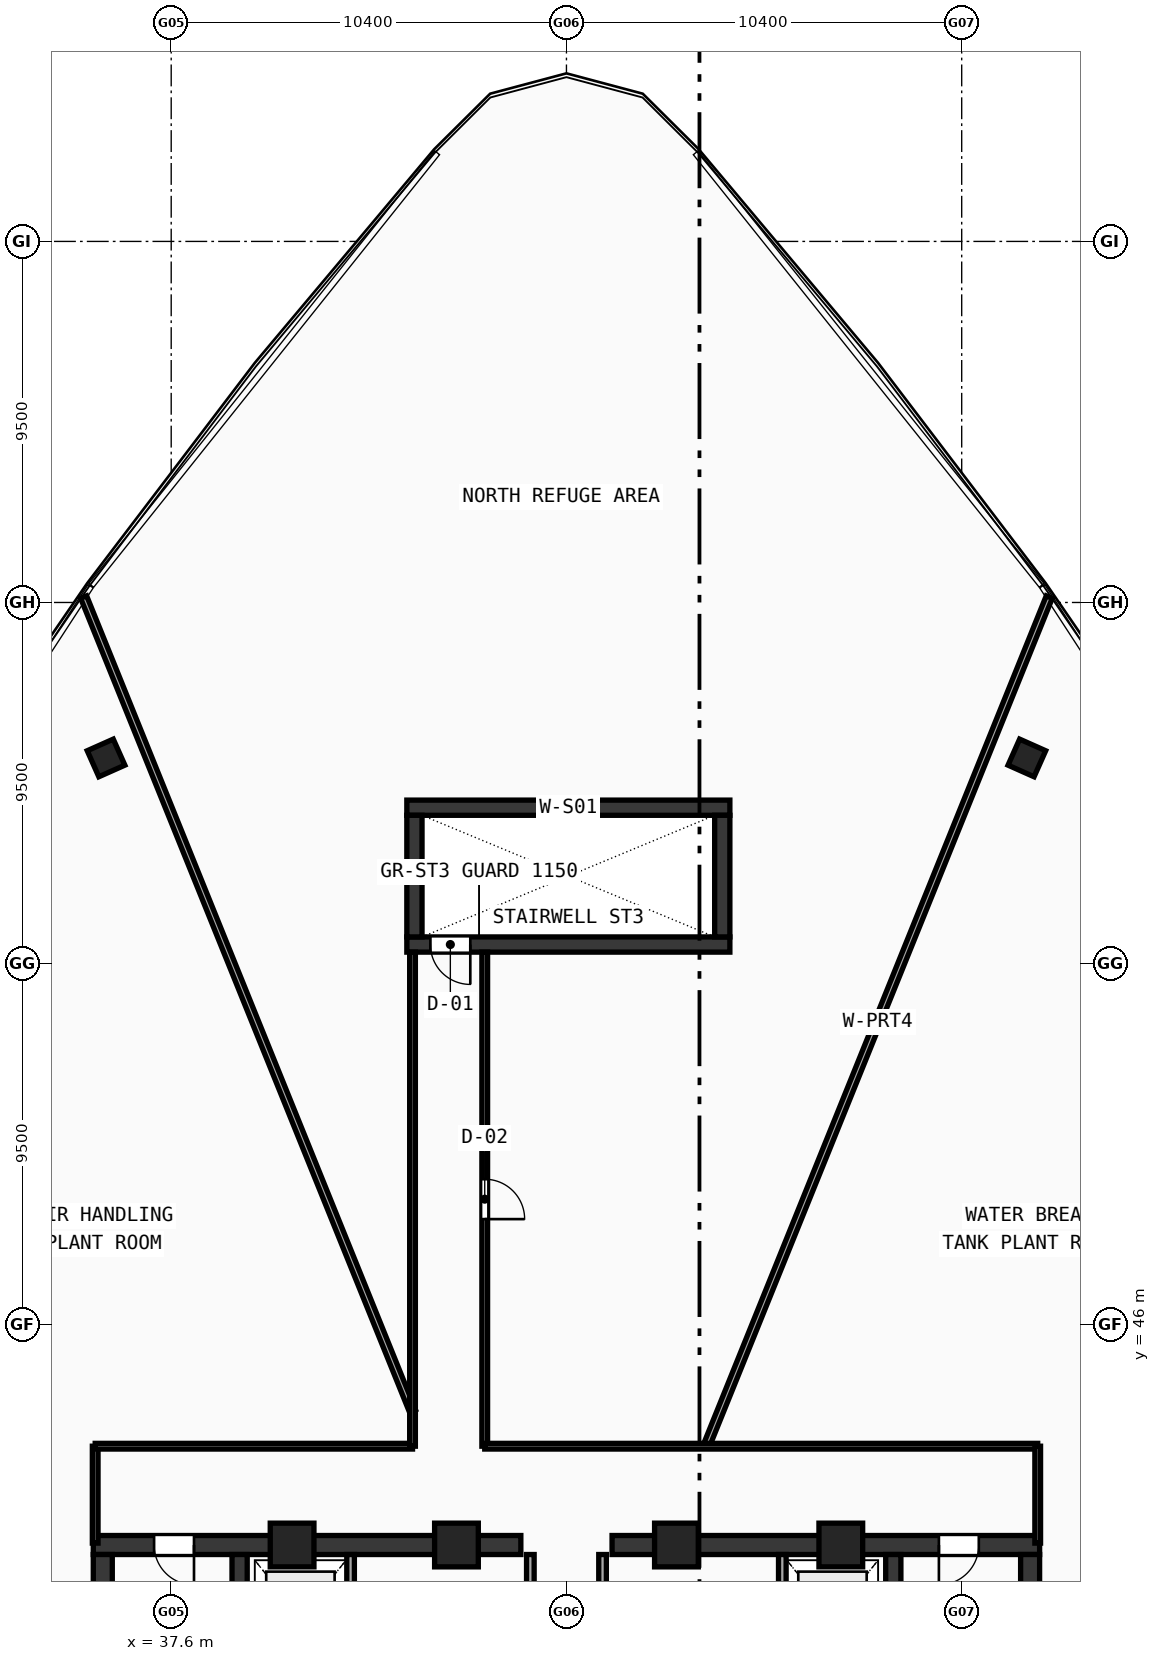
"""IFC4 building model, lengths in metres.
Left out: names, types, materials, properties, quantities, classifications, styles, units other than length and angle.
Written with IfcOpenShell. Run it as: python <this file> out.ifc"""

import sys

from ifc_helpers import new_model, si_unit, direction, frame, frame_2d, origin, origin_with_axes, origin_2d, place, context, subcontext, project, spatial, rectangle, hollow_rectangle, extrude, source, transform, mapped, element, fill, save


model = new_model("IFC4")
c1 = context("Model", 3, precision=1e-05, world=origin(), true_north=direction((0.0, 1.0)))
c2 = subcontext(c1, "Body", "Model", "MODEL_VIEW")
j1 = project(units=[si_unit("LENGTHUNIT", "METRE"), si_unit("PLANEANGLEUNIT", "RADIAN")], contexts=[c1])
p1 = place(None, origin())
s1 = spatial("IfcSite", under=j1, at=p1, CompositionType="ELEMENT")
p2 = place(p1, origin())
s2 = spatial("IfcBuilding", under=s1, at=p2, CompositionType="ELEMENT")
p3 = place(p2, frame((0.0, 0.0, 272.76)))
s3 = spatial("IfcBuildingStorey", under=s2, at=p3, CompositionType="ELEMENT", Elevation=272.76)
p4 = place(p3, frame((35.55, 40.2, 0.0), z_axis=(0.0, 0.0, 1.0), x_axis=(1.0, 0.0, 0.0)))
e1 = element("IfcWall", 1, at=p4, inside=s3, PredefinedType="SHEAR", context=c2, shape_type="SweptSolid", body=[
    extrude(rectangle(XDim=11.25, YDim=0.5, at=frame_2d((5.625, 0.0))), origin(), (0.0, 0.0, 1.0), 4.54),
])
p5 = place(p4, frame((1.6, 0.0, 0.0)))
e2 = element("IfcOpeningElement", 2, at=p5, cuts=e1, PredefinedType="OPENING", context=c2, shape_type="SweptSolid", body=[
    extrude(rectangle(XDim=1.05, YDim=2.1, at=frame_2d((0.525, 1.05))), frame((0.0, 0.26, 0.0), z_axis=(0.0, -1.0, 0.0), x_axis=(1.0, 0.0, 0.0)), (0.0, 0.0, 1.0), 0.52),
])
p6 = place(p3, frame((49.2, 40.2, 0.0), z_axis=(0.0, 0.0, 1.0), x_axis=(1.0, 0.0, 0.0)))
e3 = element("IfcWall", 3, at=p6, inside=s3, PredefinedType="SHEAR", context=c2, shape_type="SweptSolid", body=[
    extrude(rectangle(XDim=11.25, YDim=0.5, at=frame_2d((5.625, 0.0))), origin(), (0.0, 0.0, 1.0), 4.54),
])
p7 = place(p6, frame((8.6, 0.0, 0.0)))
e4 = element("IfcOpeningElement", 4, at=p7, cuts=e3, PredefinedType="OPENING", context=c2, shape_type="SweptSolid", body=[
    extrude(rectangle(XDim=1.05, YDim=2.1, at=frame_2d((0.525, 1.05))), frame((0.0, 0.26, 0.0), z_axis=(0.0, -1.0, 0.0), x_axis=(1.0, 0.0, 0.0)), (0.0, 0.0, 1.0), 0.52),
])
for number, where, z_axis, x_axis in (
    (5, (35.8, 27.75, 0.0), (0.0, 0.0, 1.0), (0.0, 1.0, 0.0)),
    (6, (60.2, 27.75, 0.0), (0.0, 0.0, 1.0), (0.0, 1.0, 0.0)),
):
    element("IfcWall", number, at=place(p3, frame(where, z_axis=z_axis, x_axis=x_axis)), inside=s3, PredefinedType="SHEAR", context=c2, shape_type="SweptSolid", body=[
        extrude(rectangle(XDim=12.2, YDim=0.5, at=frame_2d((6.1, 0.0))), origin(), (0.0, 0.0, 1.0), 4.54),
    ])
p8 = place(p3, frame((39.4, 27.75, 0.0), z_axis=(0.0, 0.0, 1.0), x_axis=(0.0, 1.0, 0.0)))
e7 = element("IfcWall", 7, at=p8, inside=s3, PredefinedType="SHEAR", context=c2, shape_type="SweptSolid", body=[
    extrude(rectangle(XDim=12.2, YDim=0.4, at=frame_2d((6.1, 0.0))), origin(), (0.0, 0.0, 1.0), 4.54),
])
p9 = place(p8, frame((10.0, 0.0, 0.0)))
e8 = element("IfcOpeningElement", 8, at=p9, cuts=e7, PredefinedType="OPENING", context=c2, shape_type="SweptSolid", body=[
    extrude(rectangle(XDim=1.1, YDim=2.1, at=frame_2d((0.55, 1.05))), frame((0.0, 0.21, 0.0), z_axis=(0.0, -1.0, 0.0), x_axis=(1.0, 0.0, 0.0)), (0.0, 0.0, 1.0), 0.42),
])
p10 = place(p3, frame((56.6, 27.75, 0.0), z_axis=(0.0, 0.0, 1.0), x_axis=(0.0, 1.0, 0.0)))
e9 = element("IfcWall", 9, at=p10, inside=s3, PredefinedType="SHEAR", context=c2, shape_type="SweptSolid", body=[
    extrude(rectangle(XDim=12.2, YDim=0.4, at=frame_2d((6.1, 0.0))), origin(), (0.0, 0.0, 1.0), 4.54),
])
p11 = place(p10, frame((10.0, 0.0, 0.0)))
e10 = element("IfcOpeningElement", 10, at=p11, cuts=e9, PredefinedType="OPENING", context=c2, shape_type="SweptSolid", body=[
    extrude(rectangle(XDim=1.1, YDim=2.1, at=frame_2d((0.55, 1.05))), frame((0.0, 0.21, 0.0), z_axis=(0.0, -1.0, 0.0), x_axis=(1.0, 0.0, 0.0)), (0.0, 0.0, 1.0), 0.42),
])
p12 = place(p3, frame((43.8, 59.6, 0.0), z_axis=(0.0, 0.0, 1.0), x_axis=(1.0, 0.0, 0.0)))
e11 = element("IfcWall", 11, at=p12, inside=s3, PredefinedType="SHEAR", context=c2, shape_type="SweptSolid", body=[
    extrude(rectangle(XDim=8.5, YDim=0.4, at=frame_2d((4.25, 0.0))), origin(), (0.0, 0.0, 1.0), 4.54),
])
p13 = place(p3, frame((43.8, 56.0, 0.0), z_axis=(0.0, 0.0, 1.0), x_axis=(1.0, 0.0, 0.0)))
e12 = element("IfcWall", 12, at=p13, inside=s3, PredefinedType="SHEAR", context=c2, shape_type="SweptSolid", body=[
    extrude(rectangle(XDim=8.5, YDim=0.4, at=frame_2d((4.25, 0.0))), origin(), (0.0, 0.0, 1.0), 4.54),
])
p14 = place(p13, frame((0.62, 0.0, 0.0)))
e13 = element("IfcOpeningElement", 13, at=p14, cuts=e12, PredefinedType="OPENING", context=c2, shape_type="SweptSolid", body=[
    extrude(rectangle(XDim=1.05, YDim=2.1, at=frame_2d((0.525, 1.05))), frame((0.0, 0.21, 0.0), z_axis=(0.0, -1.0, 0.0), x_axis=(1.0, 0.0, 0.0)), (0.0, 0.0, 1.0), 0.42),
])
for number, where, z_axis, x_axis in (
    (14, (44.0, 56.2, 0.0), (0.0, 0.0, 1.0), (0.0, 1.0, 0.0)),
    (15, (52.1, 56.2, 0.0), (0.0, 0.0, 1.0), (0.0, 1.0, 0.0)),
):
    element("IfcWall", number, at=place(p3, frame(where, z_axis=z_axis, x_axis=x_axis)), inside=s3, PredefinedType="SHEAR", context=c2, shape_type="SweptSolid", body=[
        extrude(rectangle(XDim=3.2, YDim=0.4, at=frame_2d((1.6, 0.0))), origin(), (0.0, 0.0, 1.0), 4.54),
    ])
m1 = source(origin(), c2, "Body", "SweptSolid", [
    extrude(hollow_rectangle(XDim=1.15, YDim=1.15, WallThickness=0.048, at=origin_2d()), origin(), (0.0, 0.0, 1.0), 4.82),
])
for number, where, z_axis, x_axis in (
    (16, (55.219, 40.2, -0.28), (0.0, 0.0, 1.0), (1.0, 0.0, 0.0)),
    (17, (50.894, 40.2, -0.28), (0.0, 0.0, 1.0), (1.0, 0.0, 0.0)),
    (18, (45.106, 40.2, -0.28), (0.0, 0.0, 1.0), (1.0, 0.0, 0.0)),
    (19, (40.781, 40.2, -0.28), (0.0, 0.0, 1.0), (1.0, 0.0, 0.0)),
):
    element("IfcColumn", number, at=place(p3, frame(where, z_axis=z_axis, x_axis=x_axis)), inside=s3, PredefinedType="COLUMN", context=c2, shape_type="MappedRepresentation", body=[
        mapped(m1, transform((0.0, 0.0, 0.0), scale=1.0)),
    ])
m2 = source(origin(), c2, "Body", "SweptSolid", [
    extrude(hollow_rectangle(XDim=0.75, YDim=0.75, WallThickness=0.028, at=origin_2d()), origin(), (0.0, 0.0, 1.0), 4.82),
])
for number, where, z_axis, x_axis in (
    (20, (60.114, 60.909, -0.28), (0.0, 0.0, 1.0), (-0.914, 0.407, 0.0)),
    (21, (35.886, 60.909, -0.28), (0.0, 0.0, 1.0), (-0.914, -0.407, 0.0)),
):
    element("IfcColumn", number, at=place(p3, frame(where, z_axis=z_axis, x_axis=x_axis)), inside=s3, PredefinedType="COLUMN", context=c2, shape_type="MappedRepresentation", body=[
        mapped(m2, transform((0.0, 0.0, 0.0), scale=1.0)),
    ])
p15 = place(p3, frame((42.32, 33.5, 0.0), z_axis=(0.0, 0.0, 1.0), x_axis=(0.0, 1.0, 0.0)))
e22 = element("IfcWall", 22, at=p15, inside=s3, PredefinedType="SOLIDWALL", context=c2, shape_type="SweptSolid", body=[
    extrude(rectangle(XDim=6.45, YDim=0.2, at=frame_2d((3.225, 0.0))), origin(), (0.0, 0.0, 1.0), 4.54),
])
p16 = place(p15, frame((1.0, 0.0, 0.0)))
e23 = element("IfcOpeningElement", 23, at=p16, cuts=e22, PredefinedType="OPENING", context=c2, shape_type="SweptSolid", body=[
    extrude(rectangle(XDim=1.05, YDim=2.1, at=frame_2d((0.525, 1.05))), frame((0.0, 0.11, 0.0), z_axis=(0.0, -1.0, 0.0), x_axis=(1.0, 0.0, 0.0)), (0.0, 0.0, 1.0), 0.22),
])
p17 = place(p3, frame((53.68, 36.65, 0.0), z_axis=(0.0, 0.0, 1.0), x_axis=(0.0, 1.0, 0.0)))
e24 = element("IfcWall", 24, at=p17, inside=s3, PredefinedType="SOLIDWALL", context=c2, shape_type="SweptSolid", body=[
    extrude(rectangle(XDim=3.3, YDim=0.2, at=frame_2d((1.65, 0.0))), origin(), (0.0, 0.0, 1.0), 4.54),
])
for number, where, z_axis, x_axis in (
    (25, (47.05, 37.32, 0.0), (0.0, 0.0, 1.0), (0.0, 1.0, 0.0)),
    (26, (48.95, 37.32, 0.0), (0.0, 0.0, 1.0), (0.0, 1.0, 0.0)),
):
    element("IfcWall", number, at=place(p3, frame(where, z_axis=z_axis, x_axis=x_axis)), inside=s3, PredefinedType="SOLIDWALL", context=c2, shape_type="SweptSolid", body=[
        extrude(rectangle(XDim=2.63, YDim=0.2, at=frame_2d((1.315, 0.0))), origin(), (0.0, 0.0, 1.0), 4.54),
    ])
p18 = place(p3, frame((60.616, 37.063, 0.0), z_axis=(0.0, 0.0, 1.0), x_axis=(0.951059119768, 0.309008981593, 0.0)))
e27 = element("IfcWall", 27, at=p18, inside=s3, PredefinedType="PARTITIONING", context=c2, shape_type="SweptSolid", body=[
    extrude(rectangle(XDim=14.608, YDim=0.15, at=frame_2d((7.304, 0.0))), origin(), (0.0, 0.0, 1.0), 3.94),
])
for number, where, z_axis, x_axis in (
    (28, (60.184, 38.395, 0.0), (0.0, 0.0, 1.0), (0.951, 0.309, 0.0)),
    (29, (35.816, 38.395, 0.0), (0.0, 0.0, 1.0), (-0.951, 0.309, 0.0)),
):
    element("IfcWall", number, at=place(p3, frame(where, z_axis=z_axis, x_axis=x_axis)), inside=s3, PredefinedType="PARTITIONING", context=c2, shape_type="SweptSolid", body=[
        extrude(rectangle(XDim=14.375, YDim=0.15, at=frame_2d((7.188, 0.0))), origin(), (0.0, 0.0, 1.0), 3.94),
    ])
p19 = place(p3, frame((35.384, 37.063, 0.0), z_axis=(0.0, 0.0, 1.0), x_axis=(-0.951059119768, 0.309008981593, 0.0)))
e30 = element("IfcWall", 30, at=p19, inside=s3, PredefinedType="PARTITIONING", context=c2, shape_type="SweptSolid", body=[
    extrude(rectangle(XDim=14.608, YDim=0.15, at=frame_2d((7.304, 0.0))), origin(), (0.0, 0.0, 1.0), 3.94),
])
p20 = place(p3, frame((51.677, 42.8, 0.0), z_axis=(0.0, 0.0, 1.0), x_axis=(0.374618158303, 0.927179181965, 0.0)))
e31 = element("IfcWall", 31, at=p20, inside=s3, PredefinedType="PARTITIONING", context=c2, shape_type="SweptSolid", body=[
    extrude(rectangle(XDim=24.098, YDim=0.17, at=frame_2d((12.049, 0.0))), origin(), (0.0, 0.0, 1.0), 3.94),
])
p21 = place(p3, frame((43.95, 43.724, 0.0), z_axis=(0.0, 0.0, 1.0), x_axis=(-0.374611745878, 0.92718177282, 0.0)))
e32 = element("IfcWall", 32, at=p21, inside=s3, PredefinedType="PARTITIONING", context=c2, shape_type="SweptSolid", body=[
    extrude(rectangle(XDim=23.101, YDim=0.17, at=frame_2d((11.551, 0.0))), origin(), (0.0, 0.0, 1.0), 3.94),
])
p22 = place(p3, frame((35.6, 40.25, 0.0), z_axis=(0.0, 0.0, 1.0), x_axis=(0.0, 1.0, 0.0)))
e33 = element("IfcWall", 33, at=p22, inside=s3, PredefinedType="PARTITIONING", context=c2, shape_type="SweptSolid", body=[
    extrude(rectangle(XDim=2.55, YDim=0.15, at=frame_2d((1.275, 0.0))), origin(), (0.0, 0.0, 1.0), 4.19),
])
p23 = place(p3, frame((35.6, 42.8, 0.0), z_axis=(0.0, 0.0, 1.0), x_axis=(1.0, 0.0, 0.0)))
e34 = element("IfcWall", 34, at=p23, inside=s3, PredefinedType="PARTITIONING", context=c2, shape_type="SweptSolid", body=[
    extrude(rectangle(XDim=8.35, YDim=0.15, at=frame_2d((4.175, 0.0))), origin(), (0.0, 0.0, 1.0), 3.94),
])
p24 = place(p3, frame((43.95, 42.8, 0.0), z_axis=(0.0, 0.0, 1.0), x_axis=(0.0, 1.0, 0.0)))
e35 = element("IfcWall", 35, at=p24, inside=s3, PredefinedType="PARTITIONING", context=c2, shape_type="SweptSolid", body=[
    extrude(rectangle(XDim=13.0, YDim=0.15, at=frame_2d((6.5, 0.0))), origin(), (0.0, 0.0, 1.0), 3.94),
])
p25 = place(p3, frame((45.85, 55.8, 0.0), z_axis=(0.0, 0.0, 1.0), x_axis=(0.0, -1.0, 0.0)))
e36 = element("IfcWall", 36, at=p25, inside=s3, PredefinedType="PARTITIONING", context=c2, shape_type="SweptSolid", body=[
    extrude(rectangle(XDim=13.0, YDim=0.15, at=frame_2d((6.5, 0.0))), origin(), (0.0, 0.0, 1.0), 4.19),
])
p26 = place(p25, frame((5.975, 0.0, 0.0)))
e37 = element("IfcOpeningElement", 37, at=p26, cuts=e36, PredefinedType="OPENING", context=c2, shape_type="SweptSolid", body=[
    extrude(rectangle(XDim=1.05, YDim=2.1, at=frame_2d((0.525, 1.05))), frame((0.0, 0.085, 0.0), z_axis=(0.0, -1.0, 0.0), x_axis=(1.0, 0.0, 0.0)), (0.0, 0.0, 1.0), 0.17),
])
p27 = place(p3, frame((45.85, 42.8, 0.0), z_axis=(0.0, 0.0, 1.0), x_axis=(1.0, 0.0, 0.0)))
e38 = element("IfcWall", 38, at=p27, inside=s3, PredefinedType="PARTITIONING", context=c2, shape_type="SweptSolid", body=[
    extrude(rectangle(XDim=14.55, YDim=0.15, at=frame_2d((7.275, 0.0))), origin(), (0.0, 0.0, 1.0), 3.94),
])
p28 = place(p3, frame((60.4, 42.8, 0.0), z_axis=(0.0, 0.0, 1.0), x_axis=(0.0, -1.0, 0.0)))
e39 = element("IfcWall", 39, at=p28, inside=s3, PredefinedType="PARTITIONING", context=c2, shape_type="SweptSolid", body=[
    extrude(rectangle(XDim=2.55, YDim=0.15, at=frame_2d((1.275, 0.0))), origin(), (0.0, 0.0, 1.0), 4.19),
])
m3 = source(origin(), c2, "Body", "SweptSolid", [
    extrude(rectangle(XDim=1.05, YDim=2.1, at=frame_2d((0.525, 1.05))), frame((0.0, 0.025, 0.0), z_axis=(0.0, -1.0, 0.0), x_axis=(1.0, 0.0, 0.0)), (0.0, 0.0, 1.0), 0.05),
])
p29 = place(p5, frame((1.05, 0.0, 0.0), z_axis=(0.0, 0.0, 1.0), x_axis=(-1.0, 0.0, 0.0)))
e40 = element("IfcDoor", 40, at=p29, inside=s3, OperationType="SINGLE_SWING_LEFT", PredefinedType="DOOR", context=c2, shape_type="MappedRepresentation", body=[
    mapped(m3, transform((0.0, 0.0, 0.0), scale=1.0)),
])
fill(e2, e40)
p30 = place(p7, frame((1.05, 0.0, 0.0), z_axis=(0.0, 0.0, 1.0), x_axis=(-1.0, 0.0, 0.0)))
e41 = element("IfcDoor", 41, at=p30, inside=s3, OperationType="SINGLE_SWING_RIGHT", PredefinedType="DOOR", context=c2, shape_type="MappedRepresentation", body=[
    mapped(m3, transform((0.0, 0.0, 0.0), scale=1.0)),
])
fill(e4, e41)
p31 = place(p14, frame((1.05, 0.0, 0.0), z_axis=(0.0, 0.0, 1.0), x_axis=(-1.0, 0.0, 0.0)))
e42 = element("IfcDoor", 42, at=p31, inside=s3, OperationType="SINGLE_SWING_LEFT", PredefinedType="DOOR", context=c2, shape_type="MappedRepresentation", body=[
    mapped(m3, transform((0.0, 0.0, 0.0), scale=1.0)),
])
fill(e13, e42)
p32 = place(p26, origin_with_axes())
e43 = element("IfcDoor", 43, at=p32, inside=s3, OperationType="SINGLE_SWING_RIGHT", PredefinedType="DOOR", context=c2, shape_type="MappedRepresentation", body=[
    mapped(m3, transform((0.0, 0.0, 0.0), scale=1.0)),
])
fill(e37, e43)
save(model, sys.argv[1])
